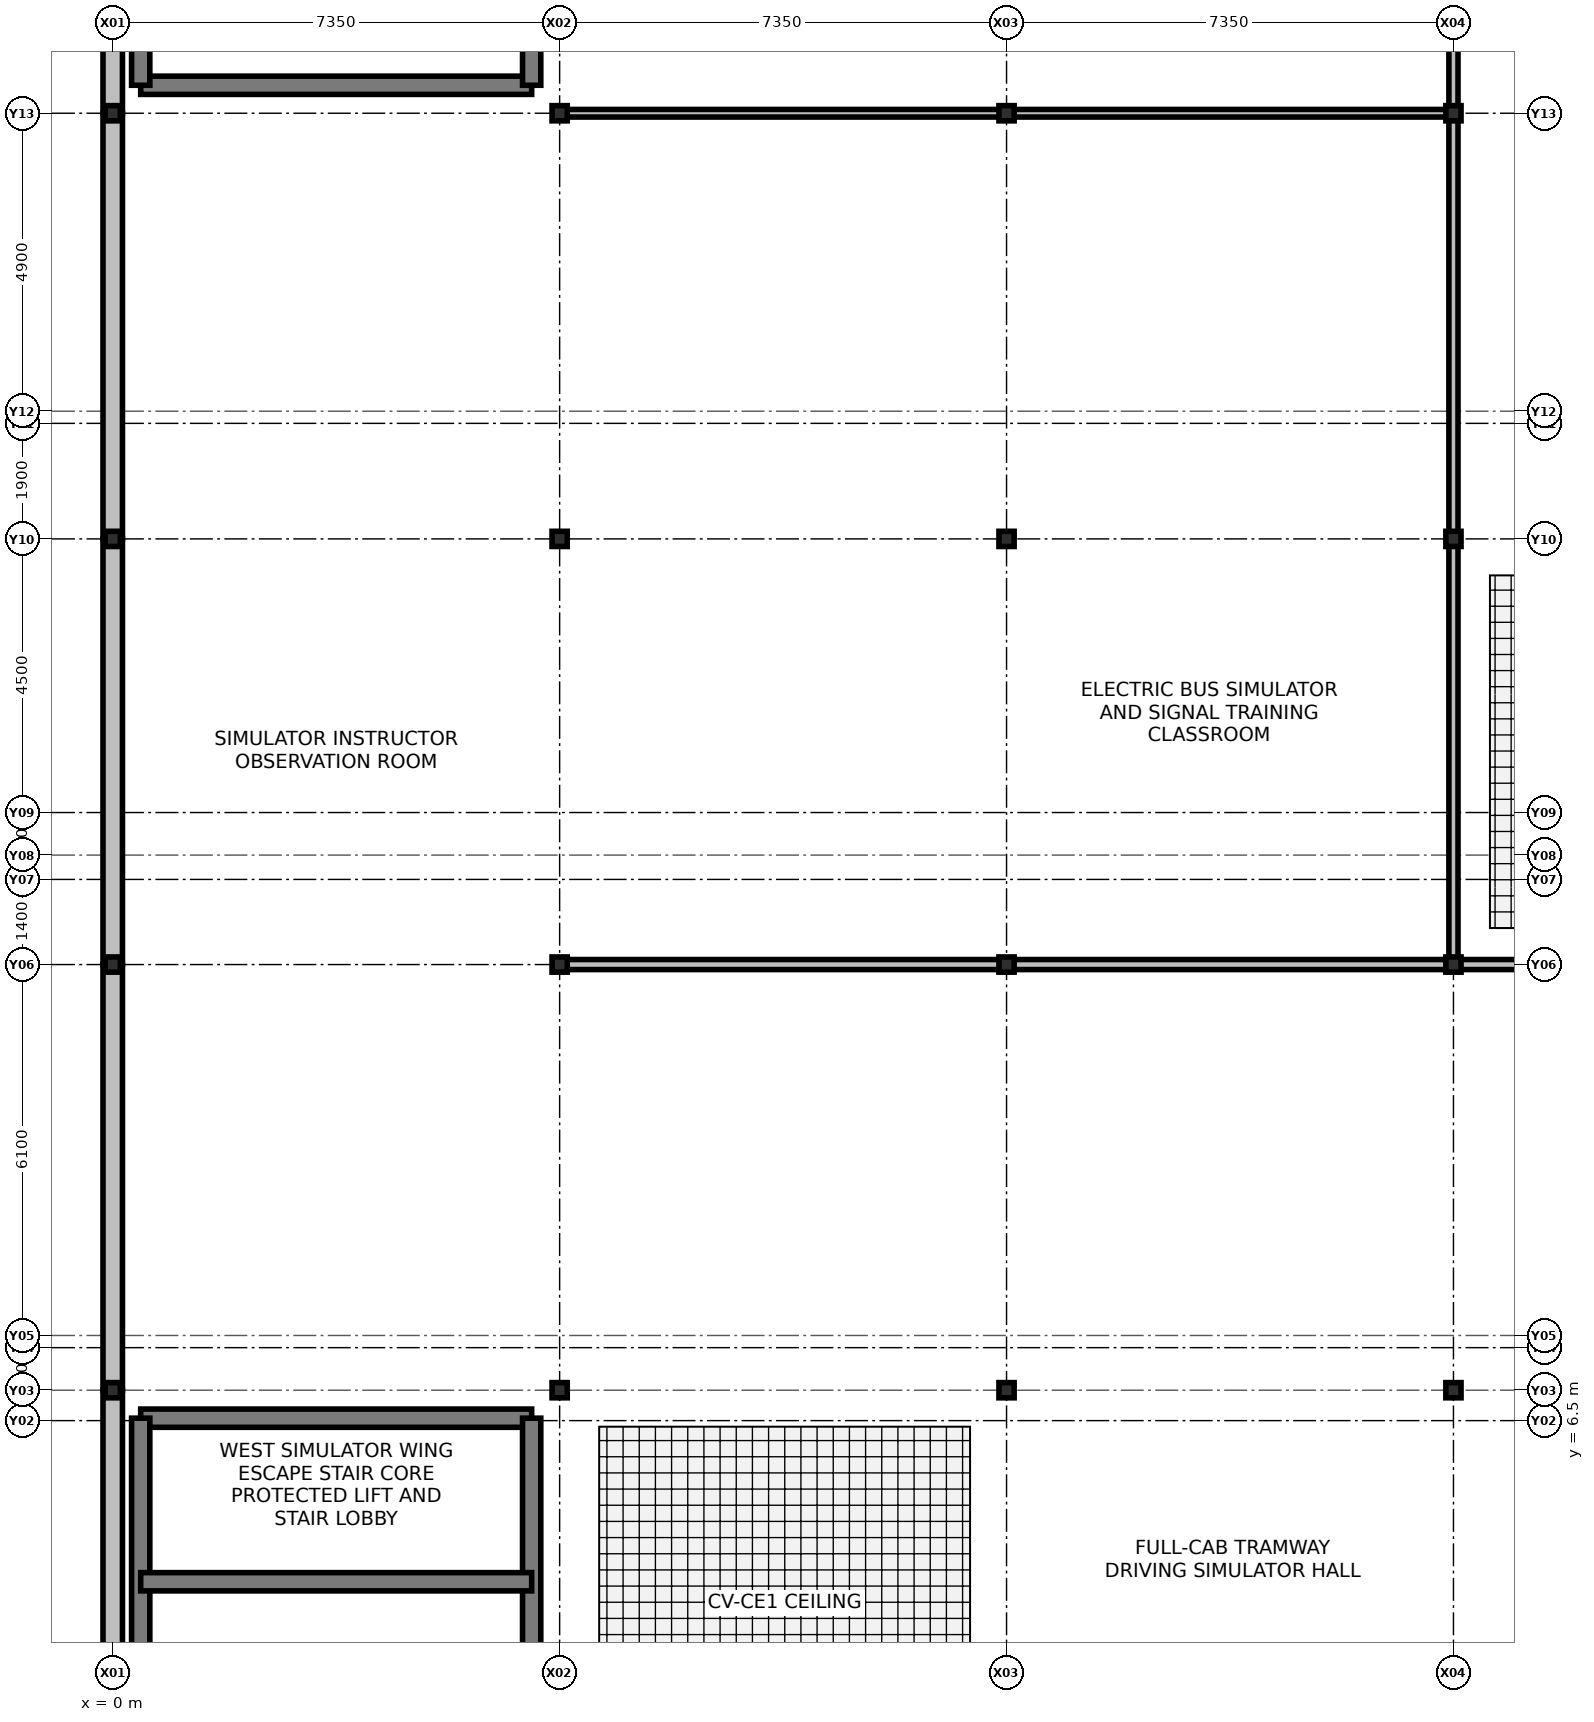
"""IFC4 building model, lengths in metres.
Left out: names, types, materials, properties, quantities, classifications, styles, units other than length and angle.
Written with IfcOpenShell. Run it as: python <this file> out.ifc"""

import sys

from ifc_helpers import new_model, si_unit, direction, frame, frame_2d, origin, origin_2d, place, context, subcontext, project, spatial, rectangle, i_section, extrude, element, fill, save


model = new_model("IFC4")
c1 = context("Model", 3, precision=1e-05, world=origin(), true_north=direction((0.0, 1.0)))
c2 = subcontext(c1, "Body", "Model", "MODEL_VIEW")
j1 = project(units=[si_unit("LENGTHUNIT", "METRE"), si_unit("PLANEANGLEUNIT", "RADIAN")], contexts=[c1])
p1 = place(None, origin())
s1 = spatial("IfcSite", under=j1, at=p1, CompositionType="ELEMENT")
p2 = place(p1, origin())
s2 = spatial("IfcBuilding", under=s1, at=p2, CompositionType="ELEMENT")
p3 = place(p2, frame((0.0, 0.0, 15.3)))
s3 = spatial("IfcBuildingStorey", under=s2, at=p3, CompositionType="ELEMENT", Elevation=15.3)
for number, where, z_axis, x_axis in (
    (1, (0.0, 7.0, 0.0), (0.0, 0.0, 1.0), (1.0, 0.0, 0.0)),
    (2, (0.0, 14.0, 0.0), (0.0, 0.0, 1.0), (1.0, 0.0, 0.0)),
    (3, (0.0, 21.0, 0.0), (0.0, 0.0, 1.0), (1.0, 0.0, 0.0)),
    (4, (0.0, 28.0, 0.0), (0.0, 0.0, 1.0), (1.0, 0.0, 0.0)),
    (5, (7.35, 7.0, 0.0), (0.0, 0.0, 1.0), (1.0, 0.0, 0.0)),
    (6, (7.35, 14.0, 0.0), (0.0, 0.0, 1.0), (1.0, 0.0, 0.0)),
    (7, (7.35, 21.0, 0.0), (0.0, 0.0, 1.0), (1.0, 0.0, 0.0)),
    (8, (7.35, 28.0, 0.0), (0.0, 0.0, 1.0), (1.0, 0.0, 0.0)),
    (9, (14.7, 7.0, 0.0), (0.0, 0.0, 1.0), (1.0, 0.0, 0.0)),
    (10, (14.7, 14.0, 0.0), (0.0, 0.0, 1.0), (1.0, 0.0, 0.0)),
    (11, (14.7, 21.0, 0.0), (0.0, 0.0, 1.0), (1.0, 0.0, 0.0)),
    (12, (14.7, 28.0, 0.0), (0.0, 0.0, 1.0), (1.0, 0.0, 0.0)),
    (13, (22.05, 7.0, 0.0), (0.0, 0.0, 1.0), (1.0, 0.0, 0.0)),
    (14, (22.05, 14.0, 0.0), (0.0, 0.0, 1.0), (1.0, 0.0, 0.0)),
    (15, (22.05, 21.0, 0.0), (0.0, 0.0, 1.0), (1.0, 0.0, 0.0)),
    (16, (22.05, 28.0, 0.0), (0.0, 0.0, 1.0), (1.0, 0.0, 0.0)),
):
    element("IfcColumn", number, at=place(p3, frame(where, z_axis=z_axis, x_axis=x_axis)), inside=s3, PredefinedType="COLUMN", context=c2, shape_type="SweptSolid", body=[
        extrude(i_section(OverallWidth=0.25, OverallDepth=0.25, WebThickness=0.009, FlangeThickness=0.014, at=origin_2d()), origin(), (0.0, 0.0, 1.0), 4.2),
    ])
p4 = place(p3, frame((0.0, 0.0, 0.0), z_axis=(0.0, 0.0, 1.0), x_axis=(0.0, 1.0, 0.0)))
e17 = element("IfcWall", 17, at=p4, inside=s3, PredefinedType="SOLIDWALL", context=c2, shape_type="SweptSolid", body=[
    extrude(rectangle(XDim=7.0, YDim=0.32, at=frame_2d((3.5, 0.0))), origin(), (0.0, 0.0, 1.0), 3.45),
])
p5 = place(p4, frame((2.2, 0.0, 0.9)))
e18 = element("IfcOpeningElement", 18, at=p5, cuts=e17, PredefinedType="OPENING", context=c2, shape_type="SweptSolid", body=[
    extrude(rectangle(XDim=2.45, YDim=2.05, at=frame_2d((1.225, 1.025))), frame((0.0, 0.17, 0.0), z_axis=(0.0, -1.0, 0.0), x_axis=(1.0, 0.0, 0.0)), (0.0, 0.0, 1.0), 0.34),
])
p6 = place(p3, frame((0.0, 7.0, 0.0), z_axis=(0.0, 0.0, 1.0), x_axis=(0.0, 1.0, 0.0)))
e19 = element("IfcWall", 19, at=p6, inside=s3, PredefinedType="SOLIDWALL", context=c2, shape_type="SweptSolid", body=[
    extrude(rectangle(XDim=7.0, YDim=0.32, at=frame_2d((3.5, 0.0))), origin(), (0.0, 0.0, 1.0), 3.45),
])
p7 = place(p6, frame((2.2, 0.0, 0.9)))
e20 = element("IfcOpeningElement", 20, at=p7, cuts=e19, PredefinedType="OPENING", context=c2, shape_type="SweptSolid", body=[
    extrude(rectangle(XDim=3.15, YDim=1.95, at=frame_2d((1.575, 0.975))), frame((0.0, 0.17, 0.0), z_axis=(0.0, -1.0, 0.0), x_axis=(1.0, 0.0, 0.0)), (0.0, 0.0, 1.0), 0.34),
])
p8 = place(p3, frame((0.0, 14.0, 0.0), z_axis=(0.0, 0.0, 1.0), x_axis=(0.0, 1.0, 0.0)))
e21 = element("IfcWall", 21, at=p8, inside=s3, PredefinedType="SOLIDWALL", context=c2, shape_type="SweptSolid", body=[
    extrude(rectangle(XDim=7.0, YDim=0.32, at=frame_2d((3.5, 0.0))), origin(), (0.0, 0.0, 1.0), 3.45),
])
p9 = place(p8, frame((2.2, 0.0, 0.9)))
e22 = element("IfcOpeningElement", 22, at=p9, cuts=e21, PredefinedType="OPENING", context=c2, shape_type="SweptSolid", body=[
    extrude(rectangle(XDim=1.4, YDim=1.6, at=frame_2d((0.7, 0.8))), frame((0.0, 0.17, 0.0), z_axis=(0.0, -1.0, 0.0), x_axis=(1.0, 0.0, 0.0)), (0.0, 0.0, 1.0), 0.34),
])
p10 = place(p3, frame((0.0, 21.0, 0.0), z_axis=(0.0, 0.0, 1.0), x_axis=(0.0, 1.0, 0.0)))
e23 = element("IfcWall", 23, at=p10, inside=s3, PredefinedType="SOLIDWALL", context=c2, shape_type="SweptSolid", body=[
    extrude(rectangle(XDim=7.0, YDim=0.32, at=frame_2d((3.5, 0.0))), origin(), (0.0, 0.0, 1.0), 3.45),
])
p11 = place(p10, frame((2.2, 0.0, 0.9)))
e24 = element("IfcOpeningElement", 24, at=p11, cuts=e23, PredefinedType="OPENING", context=c2, shape_type="SweptSolid", body=[
    extrude(rectangle(XDim=2.0, YDim=1.8, at=frame_2d((1.0, 0.9))), frame((0.0, 0.17, 0.0), z_axis=(0.0, -1.0, 0.0), x_axis=(1.0, 0.0, 0.0)), (0.0, 0.0, 1.0), 0.34),
])
p12 = place(p3, frame((0.0, 28.0, 0.0), z_axis=(0.0, 0.0, 1.0), x_axis=(0.0, 1.0, 0.0)))
e25 = element("IfcWall", 25, at=p12, inside=s3, PredefinedType="SOLIDWALL", context=c2, shape_type="SweptSolid", body=[
    extrude(rectangle(XDim=7.0, YDim=0.32, at=frame_2d((3.5, 0.0))), origin(), (0.0, 0.0, 1.0), 3.45),
])
p13 = place(p12, frame((2.2, 0.0, 0.9)))
e26 = element("IfcOpeningElement", 26, at=p13, cuts=e25, PredefinedType="OPENING", context=c2, shape_type="SweptSolid", body=[
    extrude(rectangle(XDim=2.8, YDim=2.1, at=frame_2d((1.4, 1.05))), frame((0.0, 0.17, 0.0), z_axis=(0.0, -1.0, 0.0), x_axis=(1.0, 0.0, 0.0)), (0.0, 0.0, 1.0), 0.34),
])
p14 = place(p3, frame((0.46, 28.46, 0.0), z_axis=(0.0, 0.0, 1.0), x_axis=(1.0, 0.0, 0.0)))
e27 = element("IfcWall", 27, at=p14, inside=s3, PredefinedType="SHEAR", context=c2, shape_type="SweptSolid", body=[
    extrude(rectangle(XDim=6.43, YDim=0.3, at=frame_2d((3.215, 0.0))), origin(), (0.0, 0.0, 1.0), 3.92),
])
for number, where, z_axis, x_axis in (
    (28, (0.46, 28.46, 0.0), (0.0, 0.0, 1.0), (0.0, 1.0, 0.0)),
    (29, (6.89, 28.46, 0.0), (0.0, 0.0, 1.0), (0.0, 1.0, 0.0)),
):
    element("IfcWall", number, at=place(p3, frame(where, z_axis=z_axis, x_axis=x_axis)), inside=s3, PredefinedType="SHEAR", context=c2, shape_type="SweptSolid", body=[
        extrude(rectangle(XDim=6.08, YDim=0.3, at=frame_2d((3.04, 0.0))), origin(), (0.0, 0.0, 1.0), 3.92),
    ])
p15 = place(p3, frame((0.46, 6.54, 0.0), z_axis=(0.0, 0.0, 1.0), x_axis=(1.0, 0.0, 0.0)))
e30 = element("IfcWall", 30, at=p15, inside=s3, PredefinedType="SHEAR", context=c2, shape_type="SweptSolid", body=[
    extrude(rectangle(XDim=6.43, YDim=0.3, at=frame_2d((3.215, 0.0))), origin(), (0.0, 0.0, 1.0), 3.92),
])
p16 = place(p15, frame((0.55, 0.0, 0.0)))
e31 = element("IfcOpeningElement", 31, at=p16, cuts=e30, PredefinedType="OPENING", context=c2, shape_type="SweptSolid", body=[
    extrude(rectangle(XDim=1.5, YDim=2.2, at=frame_2d((0.75, 1.1))), frame((0.0, 0.16, 0.0), z_axis=(0.0, -1.0, 0.0), x_axis=(1.0, 0.0, 0.0)), (0.0, 0.0, 1.0), 0.32),
])
for number, where, z_axis, x_axis in (
    (32, (0.46, 0.46, 0.0), (0.0, 0.0, 1.0), (0.0, 1.0, 0.0)),
    (33, (6.89, 0.46, 0.0), (0.0, 0.0, 1.0), (0.0, 1.0, 0.0)),
):
    element("IfcWall", number, at=place(p3, frame(where, z_axis=z_axis, x_axis=x_axis)), inside=s3, PredefinedType="SHEAR", context=c2, shape_type="SweptSolid", body=[
        extrude(rectangle(XDim=6.08, YDim=0.3, at=frame_2d((3.04, 0.0))), origin(), (0.0, 0.0, 1.0), 3.92),
    ])
p17 = place(p3, frame((0.46, 3.85, 0.0), z_axis=(0.0, 0.0, 1.0), x_axis=(1.0, 0.0, 0.0)))
e34 = element("IfcWall", 34, at=p17, inside=s3, PredefinedType="SHEAR", context=c2, shape_type="SweptSolid", body=[
    extrude(rectangle(XDim=6.43, YDim=0.3, at=frame_2d((3.215, 0.0))), origin(), (0.0, 0.0, 1.0), 3.92),
])
p18 = place(p17, frame((0.185, 0.0, 0.0)))
e35 = element("IfcOpeningElement", 35, at=p18, cuts=e34, PredefinedType="OPENING", context=c2, shape_type="SweptSolid", body=[
    extrude(rectangle(XDim=1.05, YDim=2.15, at=frame_2d((0.525, 1.075))), frame((0.0, 0.16, 0.0), z_axis=(0.0, -1.0, 0.0), x_axis=(1.0, 0.0, 0.0)), (0.0, 0.0, 1.0), 0.32),
])
p19 = place(p3, frame((7.35, 14.0, 0.0), z_axis=(0.0, 0.0, 1.0), x_axis=(1.0, 0.0, 0.0)))
e36 = element("IfcWall", 36, at=p19, inside=s3, PredefinedType="PARTITIONING", context=c2, shape_type="SweptSolid", body=[
    extrude(rectangle(XDim=22.05, YDim=0.165, at=frame_2d((11.025, 0.0))), origin(), (0.0, 0.0, 1.0), 3.2),
])
p20 = place(p19, frame((4.0, 0.0, 0.0)))
e37 = element("IfcOpeningElement", 37, at=p20, cuts=e36, PredefinedType="OPENING", context=c2, shape_type="SweptSolid", body=[
    extrude(rectangle(XDim=1.7, YDim=2.25, at=frame_2d((0.85, 1.125))), frame((0.0, 0.092, 0.0), z_axis=(0.0, -1.0, 0.0), x_axis=(1.0, 0.0, 0.0)), (0.0, 0.0, 1.0), 0.185),
])
p21 = place(p3, frame((22.05, 14.0, 0.0), z_axis=(0.0, 0.0, 1.0), x_axis=(0.0, 1.0, 0.0)))
e38 = element("IfcWall", 38, at=p21, inside=s3, PredefinedType="PARTITIONING", context=c2, shape_type="SweptSolid", body=[
    extrude(rectangle(XDim=21.0, YDim=0.15, at=frame_2d((10.5, 0.0))), origin(), (0.0, 0.0, 1.0), 3.2),
])
p22 = place(p21, frame((4.0, 0.0, 0.0)))
e39 = element("IfcOpeningElement", 39, at=p22, cuts=e38, PredefinedType="OPENING", context=c2, shape_type="SweptSolid", body=[
    extrude(rectangle(XDim=1.25, YDim=2.15, at=frame_2d((0.625, 1.075))), frame((0.0, 0.085, 0.0), z_axis=(0.0, -1.0, 0.0), x_axis=(1.0, 0.0, 0.0)), (0.0, 0.0, 1.0), 0.17),
])
p23 = place(p21, frame((17.5, 0.0, 0.0)))
e40 = element("IfcOpeningElement", 40, at=p23, cuts=e38, PredefinedType="OPENING", context=c2, shape_type="SweptSolid", body=[
    extrude(rectangle(XDim=1.15, YDim=2.15, at=frame_2d((0.575, 1.075))), frame((0.0, 0.085, 0.0), z_axis=(0.0, -1.0, 0.0), x_axis=(1.0, 0.0, 0.0)), (0.0, 0.0, 1.0), 0.17),
])
p24 = place(p3, frame((7.35, 28.0, 0.0), z_axis=(0.0, 0.0, 1.0), x_axis=(1.0, 0.0, 0.0)))
e41 = element("IfcWall", 41, at=p24, inside=s3, PredefinedType="PARTITIONING", context=c2, shape_type="SweptSolid", body=[
    extrude(rectangle(XDim=14.7, YDim=0.125, at=frame_2d((7.35, 0.0))), origin(), (0.0, 0.0, 1.0), 3.2),
])
p25 = place(p24, frame((4.0, 0.0, 0.0)))
e42 = element("IfcOpeningElement", 42, at=p25, cuts=e41, PredefinedType="OPENING", context=c2, shape_type="SweptSolid", body=[
    extrude(rectangle(XDim=1.35, YDim=2.2, at=frame_2d((0.675, 1.1))), frame((0.0, 0.072, 0.0), z_axis=(0.0, -1.0, 0.0), x_axis=(1.0, 0.0, 0.0)), (0.0, 0.0, 1.0), 0.145),
])
p26 = place(p5, origin())
e43 = element("IfcWindow", 43, at=p26, inside=s3, PartitioningType="SINGLE_PANEL", PredefinedType="WINDOW", context=c2, shape_type="SweptSolid", body=[
    extrude(rectangle(XDim=2.45, YDim=2.05, at=frame_2d((1.225, 1.025))), frame((0.0, 0.03, 0.0), z_axis=(0.0, -1.0, 0.0), x_axis=(1.0, 0.0, 0.0)), (0.0, 0.0, 1.0), 0.06),
])
fill(e18, e43)
p27 = place(p7, origin())
e44 = element("IfcWindow", 44, at=p27, inside=s3, PartitioningType="SINGLE_PANEL", PredefinedType="WINDOW", context=c2, shape_type="SweptSolid", body=[
    extrude(rectangle(XDim=3.15, YDim=1.95, at=frame_2d((1.575, 0.975))), frame((0.0, 0.03, 0.0), z_axis=(0.0, -1.0, 0.0), x_axis=(1.0, 0.0, 0.0)), (0.0, 0.0, 1.0), 0.06),
])
fill(e20, e44)
p28 = place(p9, origin())
e45 = element("IfcWindow", 45, at=p28, inside=s3, PartitioningType="SINGLE_PANEL", PredefinedType="WINDOW", context=c2, shape_type="SweptSolid", body=[
    extrude(rectangle(XDim=1.4, YDim=1.6, at=frame_2d((0.7, 0.8))), frame((0.0, 0.03, 0.0), z_axis=(0.0, -1.0, 0.0), x_axis=(1.0, 0.0, 0.0)), (0.0, 0.0, 1.0), 0.06),
])
fill(e22, e45)
p29 = place(p11, origin())
e46 = element("IfcWindow", 46, at=p29, inside=s3, PartitioningType="SINGLE_PANEL", PredefinedType="WINDOW", context=c2, shape_type="SweptSolid", body=[
    extrude(rectangle(XDim=2.0, YDim=1.8, at=frame_2d((1.0, 0.9))), frame((0.0, 0.03, 0.0), z_axis=(0.0, -1.0, 0.0), x_axis=(1.0, 0.0, 0.0)), (0.0, 0.0, 1.0), 0.06),
])
fill(e24, e46)
p30 = place(p18, origin())
e47 = element("IfcDoor", 47, at=p30, inside=s3, OperationType="SINGLE_SWING_RIGHT", PredefinedType="DOOR", context=c2, shape_type="SweptSolid", body=[
    extrude(rectangle(XDim=1.05, YDim=2.15, at=frame_2d((0.525, 1.075))), frame((0.0, 0.025, 0.0), z_axis=(0.0, -1.0, 0.0), x_axis=(1.0, 0.0, 0.0)), (0.0, 0.0, 1.0), 0.05),
])
fill(e35, e47)
p31 = place(p16, origin())
e48 = element("IfcDoor", 48, at=p31, inside=s3, OperationType="DOUBLE_DOOR_SINGLE_SWING", PredefinedType="DOOR", context=c2, shape_type="SweptSolid", body=[
    extrude(rectangle(XDim=1.5, YDim=2.2, at=frame_2d((0.75, 1.1))), frame((0.0, 0.025, 0.0), z_axis=(0.0, -1.0, 0.0), x_axis=(1.0, 0.0, 0.0)), (0.0, 0.0, 1.0), 0.05),
])
fill(e31, e48)
p32 = place(p20, origin())
e49 = element("IfcDoor", 49, at=p32, inside=s3, OperationType="DOUBLE_DOOR_SINGLE_SWING", PredefinedType="DOOR", context=c2, shape_type="SweptSolid", body=[
    extrude(rectangle(XDim=1.7, YDim=2.25, at=frame_2d((0.85, 1.125))), frame((0.0, 0.025, 0.0), z_axis=(0.0, -1.0, 0.0), x_axis=(1.0, 0.0, 0.0)), (0.0, 0.0, 1.0), 0.05),
])
fill(e37, e49)
p33 = place(p22, origin())
e50 = element("IfcDoor", 50, at=p33, inside=s3, OperationType="SINGLE_SWING_LEFT", PredefinedType="DOOR", context=c2, shape_type="SweptSolid", body=[
    extrude(rectangle(XDim=1.25, YDim=2.15, at=frame_2d((0.625, 1.075))), frame((0.0, 0.025, 0.0), z_axis=(0.0, -1.0, 0.0), x_axis=(1.0, 0.0, 0.0)), (0.0, 0.0, 1.0), 0.05),
])
fill(e39, e50)
p34 = place(p25, origin())
e51 = element("IfcDoor", 51, at=p34, inside=s3, OperationType="DOUBLE_DOOR_SINGLE_SWING", PredefinedType="DOOR", context=c2, shape_type="SweptSolid", body=[
    extrude(rectangle(XDim=1.35, YDim=2.2, at=frame_2d((0.675, 1.1))), frame((0.0, 0.025, 0.0), z_axis=(0.0, -1.0, 0.0), x_axis=(1.0, 0.0, 0.0)), (0.0, 0.0, 1.0), 0.05),
])
fill(e42, e51)
save(model, sys.argv[1])
